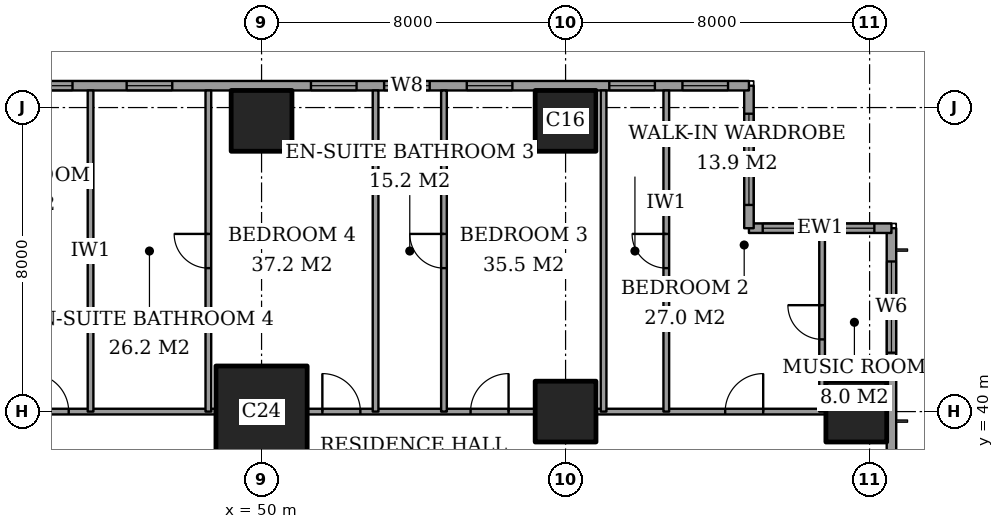
"""IFC4 building model, lengths in metres.
Left out: names, types, materials, properties, quantities, classifications, styles, units other than length and angle.
Written with IfcOpenShell. Run it as: python <this file> out.ifc"""

import sys

from ifc_helpers import new_model, si_unit, direction, frame, frame_2d, origin, origin_2d, place, context, subcontext, project, spatial, rectangle, extrude, element, fill, save


model = new_model("IFC4")
c1 = context("Model", 3, precision=1e-05, world=origin(), true_north=direction((0.0, 1.0)))
c2 = subcontext(c1, "Body", "Model", "MODEL_VIEW")
j1 = project(units=[si_unit("LENGTHUNIT", "METRE"), si_unit("PLANEANGLEUNIT", "RADIAN")], contexts=[c1])
p1 = place(None, origin())
s1 = spatial("IfcSite", under=j1, at=p1, CompositionType="ELEMENT")
p2 = place(p1, origin())
s2 = spatial("IfcBuilding", under=s1, at=p2, CompositionType="ELEMENT")
p3 = place(p2, frame((0.0, 0.0, 234.0)))
s3 = spatial("IfcBuildingStorey", under=s2, at=p3, CompositionType="ELEMENT", Elevation=234.0)
p4 = place(p3, frame((50.0, 40.0, 0.0), z_axis=(0.0, 0.0, 1.0), x_axis=(1.0, 0.0, 0.0)))
e1 = element("IfcColumn", 1, at=p4, inside=s3, PredefinedType="COLUMN", context=c2, shape_type="SweptSolid", body=[
    extrude(rectangle(XDim=2.4, YDim=2.4, at=origin_2d()), origin(), (0.0, 0.0, 1.0), 3.6),
])
for number, where, z_axis, x_axis in (
    (2, (50.0, 47.65, 0.0), (0.0, 0.0, 1.0), (1.0, 0.0, 0.0)),
    (3, (58.0, 40.0, 0.0), (0.0, 0.0, 1.0), (1.0, 0.0, 0.0)),
    (4, (58.0, 47.65, 0.0), (0.0, 0.0, 1.0), (1.0, 0.0, 0.0)),
    (5, (65.65, 40.0, 0.0), (0.0, 0.0, 1.0), (1.0, 0.0, 0.0)),
):
    element("IfcColumn", number, at=place(p3, frame(where, z_axis=z_axis, x_axis=x_axis)), inside=s3, PredefinedType="COLUMN", context=c2, shape_type="SweptSolid", body=[
        extrude(rectangle(XDim=1.6, YDim=1.6, at=origin_2d()), origin(), (0.0, 0.0, 1.0), 3.6),
    ])
p5 = place(p3, frame((66.575, 3.175, 0.0), z_axis=(0.0, 0.0, 1.0), x_axis=(0.0, 1.0, 0.0)))
e6 = element("IfcWall", 6, at=p5, inside=s3, PredefinedType="SOLIDWALL", context=c2, shape_type="SweptSolid", body=[
    extrude(rectangle(XDim=41.65, YDim=0.25, at=frame_2d((20.825, 0.0))), origin(), (0.0, 0.0, 1.0), 3.6),
])
p6 = place(p5, frame((0.875, 0.0, 0.6)))
e7 = element("IfcOpeningElement", 7, at=p6, cuts=e6, PredefinedType="OPENING", context=c2, shape_type="SweptSolid", body=[
    extrude(rectangle(XDim=2.4, YDim=2.0, at=frame_2d((1.2, 1.0))), frame((0.0, 0.135, 0.0), z_axis=(0.0, -1.0, 0.0), x_axis=(1.0, 0.0, 0.0)), (0.0, 0.0, 1.0), 0.27),
])
p7 = place(p5, frame((6.225, 0.0, 0.6)))
e8 = element("IfcOpeningElement", 8, at=p7, cuts=e6, PredefinedType="OPENING", context=c2, shape_type="SweptSolid", body=[
    extrude(rectangle(XDim=1.2, YDim=2.0, at=frame_2d((0.6, 1.0))), frame((0.0, 0.135, 0.0), z_axis=(0.0, -1.0, 0.0), x_axis=(1.0, 0.0, 0.0)), (0.0, 0.0, 1.0), 0.27),
])
p8 = place(p5, frame((8.725, 0.0, 0.6)))
e9 = element("IfcOpeningElement", 9, at=p8, cuts=e6, PredefinedType="OPENING", context=c2, shape_type="SweptSolid", body=[
    extrude(rectangle(XDim=2.4, YDim=2.0, at=frame_2d((1.2, 1.0))), frame((0.0, 0.135, 0.0), z_axis=(0.0, -1.0, 0.0), x_axis=(1.0, 0.0, 0.0)), (0.0, 0.0, 1.0), 0.27),
])
p9 = place(p5, frame((15.725, 0.0, 0.6)))
e10 = element("IfcOpeningElement", 10, at=p9, cuts=e6, PredefinedType="OPENING", context=c2, shape_type="SweptSolid", body=[
    extrude(rectangle(XDim=2.4, YDim=2.0, at=frame_2d((1.2, 1.0))), frame((0.0, 0.135, 0.0), z_axis=(0.0, -1.0, 0.0), x_axis=(1.0, 0.0, 0.0)), (0.0, 0.0, 1.0), 0.27),
])
p10 = place(p5, frame((23.525, 0.0, 0.6)))
e11 = element("IfcOpeningElement", 11, at=p10, cuts=e6, PredefinedType="OPENING", context=c2, shape_type="SweptSolid", body=[
    extrude(rectangle(XDim=2.4, YDim=2.0, at=frame_2d((1.2, 1.0))), frame((0.0, 0.135, 0.0), z_axis=(0.0, -1.0, 0.0), x_axis=(1.0, 0.0, 0.0)), (0.0, 0.0, 1.0), 0.27),
])
p11 = place(p5, frame((30.725, 0.0, 0.6)))
e12 = element("IfcOpeningElement", 12, at=p11, cuts=e6, PredefinedType="OPENING", context=c2, shape_type="SweptSolid", body=[
    extrude(rectangle(XDim=2.4, YDim=2.0, at=frame_2d((1.2, 1.0))), frame((0.0, 0.135, 0.0), z_axis=(0.0, -1.0, 0.0), x_axis=(1.0, 0.0, 0.0)), (0.0, 0.0, 1.0), 0.27),
])
p12 = place(p5, frame((34.525, 0.0, 0.6)))
e13 = element("IfcOpeningElement", 13, at=p12, cuts=e6, PredefinedType="OPENING", context=c2, shape_type="SweptSolid", body=[
    extrude(rectangle(XDim=1.2, YDim=2.0, at=frame_2d((0.6, 1.0))), frame((0.0, 0.135, 0.0), z_axis=(0.0, -1.0, 0.0), x_axis=(1.0, 0.0, 0.0)), (0.0, 0.0, 1.0), 0.27),
])
p13 = place(p5, frame((38.375, 0.0, 0.6)))
e14 = element("IfcOpeningElement", 14, at=p13, cuts=e6, PredefinedType="OPENING", context=c2, shape_type="SweptSolid", body=[
    extrude(rectangle(XDim=2.4, YDim=2.0, at=frame_2d((1.2, 1.0))), frame((0.0, 0.135, 0.0), z_axis=(0.0, -1.0, 0.0), x_axis=(1.0, 0.0, 0.0)), (0.0, 0.0, 1.0), 0.27),
])
p14 = place(p3, frame((66.575, 44.825, 0.0), z_axis=(0.0, 0.0, 1.0), x_axis=(-1.0, 0.0, 0.0)))
e15 = element("IfcWall", 15, at=p14, inside=s3, PredefinedType="SOLIDWALL", context=c2, shape_type="SweptSolid", body=[
    extrude(rectangle(XDim=3.75, YDim=0.25, at=frame_2d((1.875, 0.0))), origin(), (0.0, 0.0, 1.0), 3.6),
])
p15 = place(p14, frame((0.45, 0.0, 0.6)))
e16 = element("IfcOpeningElement", 16, at=p15, cuts=e15, PredefinedType="OPENING", context=c2, shape_type="SweptSolid", body=[
    extrude(rectangle(XDim=1.2, YDim=2.0, at=frame_2d((0.6, 1.0))), frame((0.0, 0.135, 0.0), z_axis=(0.0, -1.0, 0.0), x_axis=(1.0, 0.0, 0.0)), (0.0, 0.0, 1.0), 0.27),
])
p16 = place(p14, frame((2.188, 0.0, 0.6)))
e17 = element("IfcOpeningElement", 17, at=p16, cuts=e15, PredefinedType="OPENING", context=c2, shape_type="SweptSolid", body=[
    extrude(rectangle(XDim=1.2, YDim=2.0, at=frame_2d((0.6, 1.0))), frame((0.0, 0.135, 0.0), z_axis=(0.0, -1.0, 0.0), x_axis=(1.0, 0.0, 0.0)), (0.0, 0.0, 1.0), 0.27),
])
p17 = place(p3, frame((62.825, 44.825, 0.0), z_axis=(0.0, 0.0, 1.0), x_axis=(0.0, 1.0, 0.0)))
e18 = element("IfcWall", 18, at=p17, inside=s3, PredefinedType="SOLIDWALL", context=c2, shape_type="SweptSolid", body=[
    extrude(rectangle(XDim=3.75, YDim=0.25, at=frame_2d((1.875, 0.0))), origin(), (0.0, 0.0, 1.0), 3.6),
])
p18 = place(p17, frame((0.613, 0.0, 0.6)))
e19 = element("IfcOpeningElement", 19, at=p18, cuts=e18, PredefinedType="OPENING", context=c2, shape_type="SweptSolid", body=[
    extrude(rectangle(XDim=2.4, YDim=2.0, at=frame_2d((1.2, 1.0))), frame((0.0, 0.135, 0.0), z_axis=(0.0, -1.0, 0.0), x_axis=(1.0, 0.0, 0.0)), (0.0, 0.0, 1.0), 0.27),
])
p19 = place(p3, frame((62.825, 48.575, 0.0), z_axis=(0.0, 0.0, 1.0), x_axis=(-1.0, 0.0, 0.0)))
e20 = element("IfcWall", 20, at=p19, inside=s3, PredefinedType="SOLIDWALL", context=c2, shape_type="SweptSolid", body=[
    extrude(rectangle(XDim=21.4, YDim=0.25, at=frame_2d((10.7, 0.0))), origin(), (0.0, 0.0, 1.0), 3.6),
])
p20 = place(p19, frame((0.55, 0.0, 0.6)))
e21 = element("IfcOpeningElement", 21, at=p20, cuts=e20, PredefinedType="OPENING", context=c2, shape_type="SweptSolid", body=[
    extrude(rectangle(XDim=1.2, YDim=2.0, at=frame_2d((0.6, 1.0))), frame((0.0, 0.135, 0.0), z_axis=(0.0, -1.0, 0.0), x_axis=(1.0, 0.0, 0.0)), (0.0, 0.0, 1.0), 0.27),
])
p21 = place(p19, frame((2.475, 0.0, 0.6)))
e22 = element("IfcOpeningElement", 22, at=p21, cuts=e20, PredefinedType="OPENING", context=c2, shape_type="SweptSolid", body=[
    extrude(rectangle(XDim=1.2, YDim=2.0, at=frame_2d((0.6, 1.0))), frame((0.0, 0.135, 0.0), z_axis=(0.0, -1.0, 0.0), x_axis=(1.0, 0.0, 0.0)), (0.0, 0.0, 1.0), 0.27),
])
p22 = place(p19, frame((6.225, 0.0, 0.6)))
e23 = element("IfcOpeningElement", 23, at=p22, cuts=e20, PredefinedType="OPENING", context=c2, shape_type="SweptSolid", body=[
    extrude(rectangle(XDim=1.2, YDim=2.0, at=frame_2d((0.6, 1.0))), frame((0.0, 0.135, 0.0), z_axis=(0.0, -1.0, 0.0), x_axis=(1.0, 0.0, 0.0)), (0.0, 0.0, 1.0), 0.27),
])
p23 = place(p19, frame((8.4, 0.0, 0.6)))
e24 = element("IfcOpeningElement", 24, at=p23, cuts=e20, PredefinedType="OPENING", context=c2, shape_type="SweptSolid", body=[
    extrude(rectangle(XDim=1.2, YDim=2.0, at=frame_2d((0.6, 1.0))), frame((0.0, 0.135, 0.0), z_axis=(0.0, -1.0, 0.0), x_axis=(1.0, 0.0, 0.0)), (0.0, 0.0, 1.0), 0.27),
])
p24 = place(p19, frame((10.325, 0.0, 0.6)))
e25 = element("IfcOpeningElement", 25, at=p24, cuts=e20, PredefinedType="OPENING", context=c2, shape_type="SweptSolid", body=[
    extrude(rectangle(XDim=1.2, YDim=2.0, at=frame_2d((0.6, 1.0))), frame((0.0, 0.135, 0.0), z_axis=(0.0, -1.0, 0.0), x_axis=(1.0, 0.0, 0.0)), (0.0, 0.0, 1.0), 0.27),
])
p25 = place(p19, frame((15.175, 0.0, 0.6)))
e26 = element("IfcOpeningElement", 26, at=p25, cuts=e20, PredefinedType="OPENING", context=c2, shape_type="SweptSolid", body=[
    extrude(rectangle(XDim=1.2, YDim=2.0, at=frame_2d((0.6, 1.0))), frame((0.0, 0.135, 0.0), z_axis=(0.0, -1.0, 0.0), x_axis=(1.0, 0.0, 0.0)), (0.0, 0.0, 1.0), 0.27),
])
p26 = place(p19, frame((17.8, 0.0, 0.6)))
e27 = element("IfcOpeningElement", 27, at=p26, cuts=e20, PredefinedType="OPENING", context=c2, shape_type="SweptSolid", body=[
    extrude(rectangle(XDim=1.2, YDim=2.0, at=frame_2d((0.6, 1.0))), frame((0.0, 0.135, 0.0), z_axis=(0.0, -1.0, 0.0), x_axis=(1.0, 0.0, 0.0)), (0.0, 0.0, 1.0), 0.27),
])
p27 = place(p3, frame((43.35, 40.0, 0.0), z_axis=(0.0, 0.0, 1.0), x_axis=(1.0, 0.0, 0.0)))
e28 = element("IfcWall", 28, at=p27, inside=s3, PredefinedType="PARTITIONING", context=c2, shape_type="SweptSolid", body=[
    extrude(rectangle(XDim=5.45, YDim=0.15, at=frame_2d((2.725, 0.0))), origin(), (0.0, 0.0, 1.0), 3.35),
])
p28 = place(p27, frame((0.575, 0.0, 0.0)))
e29 = element("IfcOpeningElement", 29, at=p28, cuts=e28, PredefinedType="OPENING", context=c2, shape_type="SweptSolid", body=[
    extrude(rectangle(XDim=1.0, YDim=2.1, at=frame_2d((0.5, 1.05))), frame((0.0, 0.085, 0.0), z_axis=(0.0, -1.0, 0.0), x_axis=(1.0, 0.0, 0.0)), (0.0, 0.0, 1.0), 0.17),
])
p29 = place(p3, frame((51.2, 40.0, 0.0), z_axis=(0.0, 0.0, 1.0), x_axis=(1.0, 0.0, 0.0)))
e30 = element("IfcWall", 30, at=p29, inside=s3, PredefinedType="PARTITIONING", context=c2, shape_type="SweptSolid", body=[
    extrude(rectangle(XDim=6.0, YDim=0.15, at=frame_2d((3.0, 0.0))), origin(), (0.0, 0.0, 1.0), 3.35),
])
p30 = place(p29, frame((4.3, 0.0, 0.0)))
e31 = element("IfcOpeningElement", 31, at=p30, cuts=e30, PredefinedType="OPENING", context=c2, shape_type="SweptSolid", body=[
    extrude(rectangle(XDim=1.0, YDim=2.1, at=frame_2d((0.5, 1.05))), frame((0.0, 0.085, 0.0), z_axis=(0.0, -1.0, 0.0), x_axis=(1.0, 0.0, 0.0)), (0.0, 0.0, 1.0), 0.17),
])
p31 = place(p29, frame((0.4, 0.0, 0.0)))
e32 = element("IfcOpeningElement", 32, at=p31, cuts=e30, PredefinedType="OPENING", context=c2, shape_type="SweptSolid", body=[
    extrude(rectangle(XDim=1.0, YDim=2.1, at=frame_2d((0.5, 1.05))), frame((0.0, 0.085, 0.0), z_axis=(0.0, -1.0, 0.0), x_axis=(1.0, 0.0, 0.0)), (0.0, 0.0, 1.0), 0.17),
])
p32 = place(p3, frame((58.8, 40.0, 0.0), z_axis=(0.0, 0.0, 1.0), x_axis=(1.0, 0.0, 0.0)))
e33 = element("IfcWall", 33, at=p32, inside=s3, PredefinedType="PARTITIONING", context=c2, shape_type="SweptSolid", body=[
    extrude(rectangle(XDim=6.05, YDim=0.15, at=frame_2d((3.025, 0.0))), origin(), (0.0, 0.0, 1.0), 3.35),
])
p33 = place(p32, frame((3.4, 0.0, 0.0)))
e34 = element("IfcOpeningElement", 34, at=p33, cuts=e33, PredefinedType="OPENING", context=c2, shape_type="SweptSolid", body=[
    extrude(rectangle(XDim=1.0, YDim=2.1, at=frame_2d((0.5, 1.05))), frame((0.0, 0.085, 0.0), z_axis=(0.0, -1.0, 0.0), x_axis=(1.0, 0.0, 0.0)), (0.0, 0.0, 1.0), 0.17),
])
p34 = place(p3, frame((45.5, 40.0, 0.0), z_axis=(0.0, 0.0, 1.0), x_axis=(0.0, 1.0, 0.0)))
e35 = element("IfcWall", 35, at=p34, inside=s3, PredefinedType="PARTITIONING", context=c2, shape_type="SweptSolid", body=[
    extrude(rectangle(XDim=8.45, YDim=0.15, at=frame_2d((4.225, 0.0))), origin(), (0.0, 0.0, 1.0), 3.35),
])
p35 = place(p3, frame((48.6, 40.0, 0.0), z_axis=(0.0, 0.0, 1.0), x_axis=(0.0, 1.0, 0.0)))
e36 = element("IfcWall", 36, at=p35, inside=s3, PredefinedType="PARTITIONING", context=c2, shape_type="SweptSolid", body=[
    extrude(rectangle(XDim=8.45, YDim=0.15, at=frame_2d((4.225, 0.0))), origin(), (0.0, 0.0, 1.0), 3.35),
])
p36 = place(p35, frame((3.775, 0.0, 0.0)))
e37 = element("IfcOpeningElement", 37, at=p36, cuts=e36, PredefinedType="OPENING", context=c2, shape_type="SweptSolid", body=[
    extrude(rectangle(XDim=0.9, YDim=2.1, at=frame_2d((0.45, 1.05))), frame((0.0, 0.085, 0.0), z_axis=(0.0, -1.0, 0.0), x_axis=(1.0, 0.0, 0.0)), (0.0, 0.0, 1.0), 0.17),
])
p37 = place(p3, frame((53.0, 40.0, 0.0), z_axis=(0.0, 0.0, 1.0), x_axis=(0.0, 1.0, 0.0)))
e38 = element("IfcWall", 38, at=p37, inside=s3, PredefinedType="PARTITIONING", context=c2, shape_type="SweptSolid", body=[
    extrude(rectangle(XDim=8.45, YDim=0.15, at=frame_2d((4.225, 0.0))), origin(), (0.0, 0.0, 1.0), 3.35),
])
p38 = place(p3, frame((54.8, 40.0, 0.0), z_axis=(0.0, 0.0, 1.0), x_axis=(0.0, 1.0, 0.0)))
e39 = element("IfcWall", 39, at=p38, inside=s3, PredefinedType="PARTITIONING", context=c2, shape_type="SweptSolid", body=[
    extrude(rectangle(XDim=8.45, YDim=0.15, at=frame_2d((4.225, 0.0))), origin(), (0.0, 0.0, 1.0), 3.35),
])
p39 = place(p38, frame((3.775, 0.0, 0.0)))
e40 = element("IfcOpeningElement", 40, at=p39, cuts=e39, PredefinedType="OPENING", context=c2, shape_type="SweptSolid", body=[
    extrude(rectangle(XDim=0.9, YDim=2.1, at=frame_2d((0.45, 1.05))), frame((0.0, 0.085, 0.0), z_axis=(0.0, -1.0, 0.0), x_axis=(1.0, 0.0, 0.0)), (0.0, 0.0, 1.0), 0.17),
])
p40 = place(p3, frame((59.0, 40.0, 0.0), z_axis=(0.0, 0.0, 1.0), x_axis=(0.0, 1.0, 0.0)))
e41 = element("IfcWall", 41, at=p40, inside=s3, PredefinedType="PARTITIONING", context=c2, shape_type="SweptSolid", body=[
    extrude(rectangle(XDim=8.45, YDim=0.15, at=frame_2d((4.225, 0.0))), origin(), (0.0, 0.0, 1.0), 3.35),
])
p41 = place(p3, frame((60.65, 40.0, 0.0), z_axis=(0.0, 0.0, 1.0), x_axis=(0.0, 1.0, 0.0)))
e42 = element("IfcWall", 42, at=p41, inside=s3, PredefinedType="PARTITIONING", context=c2, shape_type="SweptSolid", body=[
    extrude(rectangle(XDim=8.45, YDim=0.15, at=frame_2d((4.225, 0.0))), origin(), (0.0, 0.0, 1.0), 3.35),
])
p42 = place(p41, frame((3.775, 0.0, 0.0)))
e43 = element("IfcOpeningElement", 43, at=p42, cuts=e42, PredefinedType="OPENING", context=c2, shape_type="SweptSolid", body=[
    extrude(rectangle(XDim=0.9, YDim=2.1, at=frame_2d((0.45, 1.05))), frame((0.0, 0.085, 0.0), z_axis=(0.0, -1.0, 0.0), x_axis=(1.0, 0.0, 0.0)), (0.0, 0.0, 1.0), 0.17),
])
p43 = place(p3, frame((64.75, 40.0, 0.0), z_axis=(0.0, 0.0, 1.0), x_axis=(0.0, 1.0, 0.0)))
e44 = element("IfcWall", 44, at=p43, inside=s3, PredefinedType="PARTITIONING", context=c2, shape_type="SweptSolid", body=[
    extrude(rectangle(XDim=4.7, YDim=0.15, at=frame_2d((2.35, 0.0))), origin(), (0.0, 0.0, 1.0), 3.35),
])
p44 = place(p43, frame((1.9, 0.0, 0.0)))
e45 = element("IfcOpeningElement", 45, at=p44, cuts=e44, PredefinedType="OPENING", context=c2, shape_type="SweptSolid", body=[
    extrude(rectangle(XDim=0.9, YDim=2.1, at=frame_2d((0.45, 1.05))), frame((0.0, 0.085, 0.0), z_axis=(0.0, -1.0, 0.0), x_axis=(1.0, 0.0, 0.0)), (0.0, 0.0, 1.0), 0.17),
])
p45 = place(p13, origin())
e46 = element("IfcWindow", 46, at=p45, inside=s3, PartitioningType="SINGLE_PANEL", PredefinedType="WINDOW", context=c2, shape_type="SweptSolid", body=[
    extrude(rectangle(XDim=2.4, YDim=2.0, at=frame_2d((1.2, 1.0))), frame((0.0, 0.03, 0.0), z_axis=(0.0, -1.0, 0.0), x_axis=(1.0, 0.0, 0.0)), (0.0, 0.0, 1.0), 0.06),
])
fill(e14, e46)
p46 = place(p15, origin())
e47 = element("IfcWindow", 47, at=p46, inside=s3, PartitioningType="SINGLE_PANEL", PredefinedType="WINDOW", context=c2, shape_type="SweptSolid", body=[
    extrude(rectangle(XDim=1.2, YDim=2.0, at=frame_2d((0.6, 1.0))), frame((0.0, 0.03, 0.0), z_axis=(0.0, -1.0, 0.0), x_axis=(1.0, 0.0, 0.0)), (0.0, 0.0, 1.0), 0.06),
])
fill(e16, e47)
p47 = place(p16, origin())
e48 = element("IfcWindow", 48, at=p47, inside=s3, PartitioningType="SINGLE_PANEL", PredefinedType="WINDOW", context=c2, shape_type="SweptSolid", body=[
    extrude(rectangle(XDim=1.2, YDim=2.0, at=frame_2d((0.6, 1.0))), frame((0.0, 0.03, 0.0), z_axis=(0.0, -1.0, 0.0), x_axis=(1.0, 0.0, 0.0)), (0.0, 0.0, 1.0), 0.06),
])
fill(e17, e48)
p48 = place(p18, origin())
e49 = element("IfcWindow", 49, at=p48, inside=s3, PartitioningType="SINGLE_PANEL", PredefinedType="WINDOW", context=c2, shape_type="SweptSolid", body=[
    extrude(rectangle(XDim=2.4, YDim=2.0, at=frame_2d((1.2, 1.0))), frame((0.0, 0.03, 0.0), z_axis=(0.0, -1.0, 0.0), x_axis=(1.0, 0.0, 0.0)), (0.0, 0.0, 1.0), 0.06),
])
fill(e19, e49)
p49 = place(p20, origin())
e50 = element("IfcWindow", 50, at=p49, inside=s3, PartitioningType="SINGLE_PANEL", PredefinedType="WINDOW", context=c2, shape_type="SweptSolid", body=[
    extrude(rectangle(XDim=1.2, YDim=2.0, at=frame_2d((0.6, 1.0))), frame((0.0, 0.03, 0.0), z_axis=(0.0, -1.0, 0.0), x_axis=(1.0, 0.0, 0.0)), (0.0, 0.0, 1.0), 0.06),
])
fill(e21, e50)
p50 = place(p21, origin())
e51 = element("IfcWindow", 51, at=p50, inside=s3, PartitioningType="SINGLE_PANEL", PredefinedType="WINDOW", context=c2, shape_type="SweptSolid", body=[
    extrude(rectangle(XDim=1.2, YDim=2.0, at=frame_2d((0.6, 1.0))), frame((0.0, 0.03, 0.0), z_axis=(0.0, -1.0, 0.0), x_axis=(1.0, 0.0, 0.0)), (0.0, 0.0, 1.0), 0.06),
])
fill(e22, e51)
p51 = place(p22, origin())
e52 = element("IfcWindow", 52, at=p51, inside=s3, PartitioningType="SINGLE_PANEL", PredefinedType="WINDOW", context=c2, shape_type="SweptSolid", body=[
    extrude(rectangle(XDim=1.2, YDim=2.0, at=frame_2d((0.6, 1.0))), frame((0.0, 0.03, 0.0), z_axis=(0.0, -1.0, 0.0), x_axis=(1.0, 0.0, 0.0)), (0.0, 0.0, 1.0), 0.06),
])
fill(e23, e52)
p52 = place(p23, origin())
e53 = element("IfcWindow", 53, at=p52, inside=s3, PartitioningType="SINGLE_PANEL", PredefinedType="WINDOW", context=c2, shape_type="SweptSolid", body=[
    extrude(rectangle(XDim=1.2, YDim=2.0, at=frame_2d((0.6, 1.0))), frame((0.0, 0.03, 0.0), z_axis=(0.0, -1.0, 0.0), x_axis=(1.0, 0.0, 0.0)), (0.0, 0.0, 1.0), 0.06),
])
fill(e24, e53)
p53 = place(p24, origin())
e54 = element("IfcWindow", 54, at=p53, inside=s3, PartitioningType="SINGLE_PANEL", PredefinedType="WINDOW", context=c2, shape_type="SweptSolid", body=[
    extrude(rectangle(XDim=1.2, YDim=2.0, at=frame_2d((0.6, 1.0))), frame((0.0, 0.03, 0.0), z_axis=(0.0, -1.0, 0.0), x_axis=(1.0, 0.0, 0.0)), (0.0, 0.0, 1.0), 0.06),
])
fill(e25, e54)
p54 = place(p25, origin())
e55 = element("IfcWindow", 55, at=p54, inside=s3, PartitioningType="SINGLE_PANEL", PredefinedType="WINDOW", context=c2, shape_type="SweptSolid", body=[
    extrude(rectangle(XDim=1.2, YDim=2.0, at=frame_2d((0.6, 1.0))), frame((0.0, 0.03, 0.0), z_axis=(0.0, -1.0, 0.0), x_axis=(1.0, 0.0, 0.0)), (0.0, 0.0, 1.0), 0.06),
])
fill(e26, e55)
p55 = place(p26, origin())
e56 = element("IfcWindow", 56, at=p55, inside=s3, PartitioningType="SINGLE_PANEL", PredefinedType="WINDOW", context=c2, shape_type="SweptSolid", body=[
    extrude(rectangle(XDim=1.2, YDim=2.0, at=frame_2d((0.6, 1.0))), frame((0.0, 0.03, 0.0), z_axis=(0.0, -1.0, 0.0), x_axis=(1.0, 0.0, 0.0)), (0.0, 0.0, 1.0), 0.06),
])
fill(e27, e56)
p56 = place(p44, origin())
e57 = element("IfcDoor", 57, at=p56, inside=s3, OperationType="SINGLE_SWING_LEFT", PredefinedType="DOOR", context=c2, shape_type="SweptSolid", body=[
    extrude(rectangle(XDim=0.9, YDim=2.1, at=frame_2d((0.45, 1.05))), frame((0.0, 0.025, 0.0), z_axis=(0.0, -1.0, 0.0), x_axis=(1.0, 0.0, 0.0)), (0.0, 0.0, 1.0), 0.05),
])
fill(e45, e57)
p57 = place(p33, origin())
e58 = element("IfcDoor", 58, at=p57, inside=s3, OperationType="SINGLE_SWING_LEFT", PredefinedType="DOOR", context=c2, shape_type="SweptSolid", body=[
    extrude(rectangle(XDim=1.0, YDim=2.1, at=frame_2d((0.5, 1.05))), frame((0.0, 0.025, 0.0), z_axis=(0.0, -1.0, 0.0), x_axis=(1.0, 0.0, 0.0)), (0.0, 0.0, 1.0), 0.05),
])
fill(e34, e58)
p58 = place(p42, origin())
e59 = element("IfcDoor", 59, at=p58, inside=s3, OperationType="SINGLE_SWING_LEFT", PredefinedType="DOOR", context=c2, shape_type="SweptSolid", body=[
    extrude(rectangle(XDim=0.9, YDim=2.1, at=frame_2d((0.45, 1.05))), frame((0.0, 0.025, 0.0), z_axis=(0.0, -1.0, 0.0), x_axis=(1.0, 0.0, 0.0)), (0.0, 0.0, 1.0), 0.05),
])
fill(e43, e59)
p59 = place(p30, origin())
e60 = element("IfcDoor", 60, at=p59, inside=s3, OperationType="SINGLE_SWING_LEFT", PredefinedType="DOOR", context=c2, shape_type="SweptSolid", body=[
    extrude(rectangle(XDim=1.0, YDim=2.1, at=frame_2d((0.5, 1.05))), frame((0.0, 0.025, 0.0), z_axis=(0.0, -1.0, 0.0), x_axis=(1.0, 0.0, 0.0)), (0.0, 0.0, 1.0), 0.05),
])
fill(e31, e60)
p60 = place(p39, origin())
e61 = element("IfcDoor", 61, at=p60, inside=s3, OperationType="SINGLE_SWING_LEFT", PredefinedType="DOOR", context=c2, shape_type="SweptSolid", body=[
    extrude(rectangle(XDim=0.9, YDim=2.1, at=frame_2d((0.45, 1.05))), frame((0.0, 0.025, 0.0), z_axis=(0.0, -1.0, 0.0), x_axis=(1.0, 0.0, 0.0)), (0.0, 0.0, 1.0), 0.05),
])
fill(e40, e61)
p61 = place(p31, origin())
e62 = element("IfcDoor", 62, at=p61, inside=s3, OperationType="SINGLE_SWING_RIGHT", PredefinedType="DOOR", context=c2, shape_type="SweptSolid", body=[
    extrude(rectangle(XDim=1.0, YDim=2.1, at=frame_2d((0.5, 1.05))), frame((0.0, 0.025, 0.0), z_axis=(0.0, -1.0, 0.0), x_axis=(1.0, 0.0, 0.0)), (0.0, 0.0, 1.0), 0.05),
])
fill(e32, e62)
p62 = place(p36, origin())
e63 = element("IfcDoor", 63, at=p62, inside=s3, OperationType="SINGLE_SWING_LEFT", PredefinedType="DOOR", context=c2, shape_type="SweptSolid", body=[
    extrude(rectangle(XDim=0.9, YDim=2.1, at=frame_2d((0.45, 1.05))), frame((0.0, 0.025, 0.0), z_axis=(0.0, -1.0, 0.0), x_axis=(1.0, 0.0, 0.0)), (0.0, 0.0, 1.0), 0.05),
])
fill(e37, e63)
p63 = place(p28, origin())
e64 = element("IfcDoor", 64, at=p63, inside=s3, OperationType="SINGLE_SWING_RIGHT", PredefinedType="DOOR", context=c2, shape_type="SweptSolid", body=[
    extrude(rectangle(XDim=1.0, YDim=2.1, at=frame_2d((0.5, 1.05))), frame((0.0, 0.025, 0.0), z_axis=(0.0, -1.0, 0.0), x_axis=(1.0, 0.0, 0.0)), (0.0, 0.0, 1.0), 0.05),
])
fill(e29, e64)
save(model, sys.argv[1])
